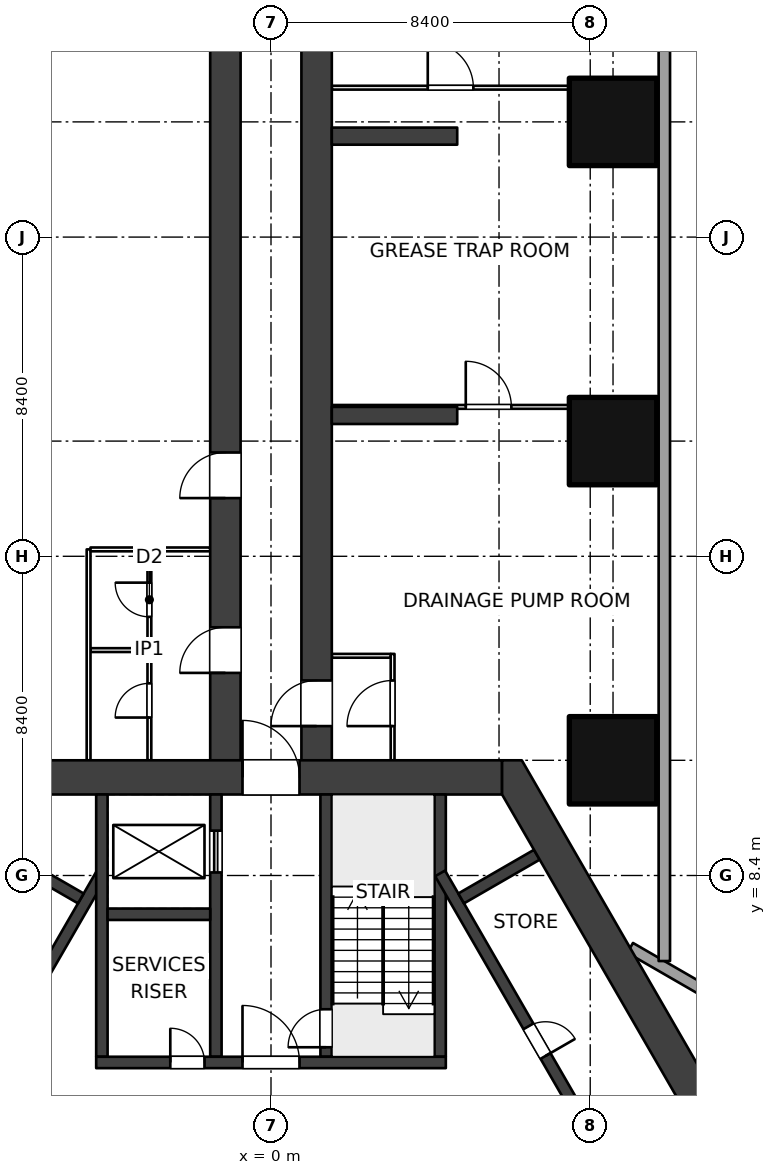
"""IFC4 building model, lengths in metres.
Left out: names, types, materials, properties, quantities, classifications, styles, units other than length and angle.
Written with IfcOpenShell. Run it as: python <this file> out.ifc"""

import sys

from ifc_helpers import new_model, si_unit, direction, frame, frame_2d, origin, origin_2d, place, context, subcontext, project, spatial, polyline, rectangle, outline, extrude, element, fill, save


model = new_model("IFC4")
c1 = context("Model", 3, precision=1e-05, world=origin(), true_north=direction((0.0, 1.0)))
c2 = subcontext(c1, "Body", "Model", "MODEL_VIEW")
j1 = project(units=[si_unit("LENGTHUNIT", "METRE"), si_unit("PLANEANGLEUNIT", "RADIAN")], contexts=[c1])
p1 = place(None, origin())
s1 = spatial("IfcSite", under=j1, at=p1, CompositionType="ELEMENT")
p2 = place(p1, origin())
s2 = spatial("IfcBuilding", under=s1, at=p2, CompositionType="ELEMENT")
p3 = place(p2, frame((0.0, 0.0, -7.0)))
s3 = spatial("IfcBuildingStorey", under=s2, at=p3, CompositionType="ELEMENT", Elevation=-7.0)
for number, where, z_axis, x_axis in (
    (1, (9.0, 11.432, 0.0), (0.0, 0.0, 1.0), (1.0, 0.0, 0.0)),
    (2, (9.0, 19.832, 0.0), (0.0, 0.0, 1.0), (1.0, 0.0, 0.0)),
    (3, (9.0, 28.231, 0.0), (0.0, 0.0, 1.0), (1.0, 0.0, 0.0)),
):
    element("IfcColumn", number, at=place(p3, frame(where, z_axis=z_axis, x_axis=x_axis)), inside=s3, PredefinedType="COLUMN", context=c2, shape_type="SweptSolid", body=[
        extrude(rectangle(XDim=2.3, YDim=2.3, at=origin_2d()), origin(), (0.0, 0.0, 1.0), 3.5),
    ])
p4 = place(p3, frame((-6.08, 10.981, 0.0), z_axis=(0.0, 0.0, 1.0), x_axis=(1.0, 0.0, 0.0)))
e4 = element("IfcWall", 4, at=p4, inside=s3, PredefinedType="SHEAR", context=c2, shape_type="SweptSolid", body=[
    extrude(rectangle(XDim=12.161, YDim=0.9, at=frame_2d((6.08, 0.0))), origin(), (0.0, 0.0, 1.0), 3.5),
])
p5 = place(p4, frame((5.33, 0.0, 0.0)))
e5 = element("IfcOpeningElement", 5, at=p5, cuts=e4, PredefinedType="OPENING", context=c2, shape_type="SweptSolid", body=[
    extrude(rectangle(XDim=1.5, YDim=2.1, at=frame_2d((0.75, 1.05))), frame((0.0, 0.46, 0.0), z_axis=(0.0, -1.0, 0.0), x_axis=(1.0, 0.0, 0.0)), (0.0, 0.0, 1.0), 0.92),
])
p6 = place(p3, origin())
e6 = element("IfcWall", 6, at=p6, inside=s3, PredefinedType="SHEAR", context=c2, shape_type="SweptSolid", body=[
    extrude(outline(polyline([(13.2, 0.0), (6.6, 11.432), (6.08, 11.432), (6.08, 10.531), (12.161, 0.0), (12.94, -0.45), (13.2, 0.0)])), origin(), (0.0, 0.0, 1.0), 3.5),
])
p7 = place(p3, frame((-4.6, 3.48, 0.0), z_axis=(0.0, 0.0, 1.0), x_axis=(1.0, 0.0, 0.0)))
e7 = element("IfcWall", 7, at=p7, inside=s3, PredefinedType="SHEAR", context=c2, shape_type="SweptSolid", body=[
    extrude(rectangle(XDim=9.2, YDim=0.3, at=frame_2d((4.6, 0.0))), origin(), (0.0, 0.0, 1.0), 3.5),
])
p8 = place(p7, frame((3.85, 0.0, 0.0)))
e8 = element("IfcOpeningElement", 8, at=p8, cuts=e7, PredefinedType="OPENING", context=c2, shape_type="SweptSolid", body=[
    extrude(rectangle(XDim=1.5, YDim=2.1, at=frame_2d((0.75, 1.05))), frame((0.0, 0.16, 0.0), z_axis=(0.0, -1.0, 0.0), x_axis=(1.0, 0.0, 0.0)), (0.0, 0.0, 1.0), 0.32),
])
p9 = place(p7, frame((1.95, 0.0, 0.0)))
e9 = element("IfcOpeningElement", 9, at=p9, cuts=e7, PredefinedType="OPENING", context=c2, shape_type="SweptSolid", body=[
    extrude(rectangle(XDim=0.9, YDim=2.1, at=frame_2d((0.45, 1.05))), frame((0.0, 0.16, 0.0), z_axis=(0.0, -1.0, 0.0), x_axis=(1.0, 0.0, 0.0)), (0.0, 0.0, 1.0), 0.32),
])
p10 = place(p3, frame((1.45, 3.63, 0.0), z_axis=(0.0, 0.0, 1.0), x_axis=(0.0, 1.0, 0.0)))
e10 = element("IfcWall", 10, at=p10, inside=s3, PredefinedType="SHEAR", context=c2, shape_type="SweptSolid", body=[
    extrude(rectangle(XDim=6.902, YDim=0.3, at=frame_2d((3.451, 0.0))), origin(), (0.0, 0.0, 1.0), 3.5),
])
p11 = place(p10, frame((0.25, 0.0, 0.0)))
e11 = element("IfcOpeningElement", 11, at=p11, cuts=e10, PredefinedType="OPENING", context=c2, shape_type="SweptSolid", body=[
    extrude(rectangle(XDim=1.0, YDim=2.1, at=frame_2d((0.5, 1.05))), frame((0.0, 0.16, 0.0), z_axis=(0.0, -1.0, 0.0), x_axis=(1.0, 0.0, 0.0)), (0.0, 0.0, 1.0), 0.32),
])
p12 = place(p3, frame((4.45, 3.63, 0.0), z_axis=(0.0, 0.0, 1.0), x_axis=(0.0, 1.0, 0.0)))
e12 = element("IfcWall", 12, at=p12, inside=s3, PredefinedType="SHEAR", context=c2, shape_type="SweptSolid", body=[
    extrude(rectangle(XDim=6.902, YDim=0.3, at=frame_2d((3.451, 0.0))), origin(), (0.0, 0.0, 1.0), 3.5),
])
p13 = place(p3, frame((-1.45, 3.63, 0.0), z_axis=(0.0, 0.0, 1.0), x_axis=(0.0, 1.0, 0.0)))
e13 = element("IfcWall", 13, at=p13, inside=s3, PredefinedType="SHEAR", context=c2, shape_type="SweptSolid", body=[
    extrude(rectangle(XDim=6.902, YDim=0.3, at=frame_2d((3.451, 0.0))), origin(), (0.0, 0.0, 1.0), 3.5),
])
p14 = place(p13, frame((4.85, 0.0, 0.0)))
e14 = element("IfcOpeningElement", 14, at=p14, cuts=e13, PredefinedType="OPENING", context=c2, shape_type="SweptSolid", body=[
    extrude(rectangle(XDim=1.1, YDim=2.1, at=frame_2d((0.55, 1.05))), frame((0.0, 0.16, 0.0), z_axis=(0.0, -1.0, 0.0), x_axis=(1.0, 0.0, 0.0)), (0.0, 0.0, 1.0), 0.32),
])
p15 = place(p3, frame((-4.45, 3.63, 0.0), z_axis=(0.0, 0.0, 1.0), x_axis=(0.0, 1.0, 0.0)))
e15 = element("IfcWall", 15, at=p15, inside=s3, PredefinedType="SHEAR", context=c2, shape_type="SweptSolid", body=[
    extrude(rectangle(XDim=6.902, YDim=0.3, at=frame_2d((3.451, 0.0))), origin(), (0.0, 0.0, 1.0), 3.5),
])
p16 = place(p3, frame((-4.3, 7.38, 0.0), z_axis=(0.0, 0.0, 1.0), x_axis=(1.0, 0.0, 0.0)))
e16 = element("IfcWall", 16, at=p16, inside=s3, PredefinedType="SHEAR", context=c2, shape_type="SweptSolid", body=[
    extrude(rectangle(XDim=2.7, YDim=0.3, at=frame_2d((1.35, 0.0))), origin(), (0.0, 0.0, 1.0), 3.5),
])
p17 = place(p3, frame((4.45, 8.455, 0.0), z_axis=(0.0, 0.0, 1.0), x_axis=(0.500002290144, -0.866024081565, 0.0)))
e17 = element("IfcWall", 17, at=p17, inside=s3, PredefinedType="SHEAR", context=c2, shape_type="SweptSolid", body=[
    extrude(rectangle(XDim=10.195, YDim=0.3, at=frame_2d((5.098, 0.0))), origin(), (0.0, 0.0, 1.0), 3.5),
])
p18 = place(p17, frame((4.648, 0.0, 0.0)))
e18 = element("IfcOpeningElement", 18, at=p18, cuts=e17, PredefinedType="OPENING", context=c2, shape_type="SweptSolid", body=[
    extrude(rectangle(XDim=0.9, YDim=2.1, at=frame_2d((0.45, 1.05))), frame((0.0, 0.16, 0.0), z_axis=(0.0, -1.0, 0.0), x_axis=(1.0, 0.0, 0.0)), (0.0, 0.0, 1.0), 0.32),
])
p19 = place(p3, frame((5.004, 7.796, 0.0), z_axis=(0.0, 0.0, 1.0), x_axis=(0.866053019151, 0.499952165731, 0.0)))
e19 = element("IfcWall", 19, at=p19, inside=s3, PredefinedType="SHEAR", context=c2, shape_type="SweptSolid", body=[
    extrude(rectangle(XDim=2.3, YDim=0.3, at=frame_2d((1.15, 0.0))), origin(), (0.0, 0.0, 1.0), 3.5),
])
p20 = place(p3, frame((-9.548, -0.374, 0.0), z_axis=(0.0, 0.0, 1.0), x_axis=(0.500002290144, 0.866024081565, 0.0)))
e20 = element("IfcWall", 20, at=p20, inside=s3, PredefinedType="SHEAR", context=c2, shape_type="SweptSolid", body=[
    extrude(rectangle(XDim=10.195, YDim=0.3, at=frame_2d((5.098, 0.0))), origin(), (0.0, 0.0, 1.0), 3.5),
])
p21 = place(p20, frame((4.648, 0.0, 0.0)))
e21 = element("IfcOpeningElement", 21, at=p21, cuts=e20, PredefinedType="OPENING", context=c2, shape_type="SweptSolid", body=[
    extrude(rectangle(XDim=0.9, YDim=2.1, at=frame_2d((0.45, 1.05))), frame((0.0, 0.16, 0.0), z_axis=(0.0, -1.0, 0.0), x_axis=(1.0, 0.0, 0.0)), (0.0, 0.0, 1.0), 0.32),
])
p22 = place(p3, frame((-5.004, 7.796, 0.0), z_axis=(0.0, 0.0, 1.0), x_axis=(-0.866053019151, 0.499952165731, 0.0)))
e22 = element("IfcWall", 22, at=p22, inside=s3, PredefinedType="SHEAR", context=c2, shape_type="SweptSolid", body=[
    extrude(rectangle(XDim=2.3, YDim=0.3, at=frame_2d((1.15, 0.0))), origin(), (0.0, 0.0, 1.0), 3.5),
])
p23 = place(p3, frame((-1.2, 10.981, 0.0), z_axis=(0.0, 0.0, 1.0), x_axis=(0.0, 1.0, 0.0)))
e23 = element("IfcWall", 23, at=p23, inside=s3, PredefinedType="SHEAR", context=c2, shape_type="SweptSolid", body=[
    extrude(rectangle(XDim=36.75, YDim=0.8, at=frame_2d((18.375, 0.0))), origin(), (0.0, 0.0, 1.0), 3.5),
])
p24 = place(p23, frame((2.75, 0.0, 0.0)))
e24 = element("IfcOpeningElement", 24, at=p24, cuts=e23, PredefinedType="OPENING", context=c2, shape_type="SweptSolid", body=[
    extrude(rectangle(XDim=1.2, YDim=2.1, at=frame_2d((0.6, 1.05))), frame((0.0, 0.41, 0.0), z_axis=(0.0, -1.0, 0.0), x_axis=(1.0, 0.0, 0.0)), (0.0, 0.0, 1.0), 0.82),
])
p25 = place(p23, frame((7.35, 0.0, 0.0)))
e25 = element("IfcOpeningElement", 25, at=p25, cuts=e23, PredefinedType="OPENING", context=c2, shape_type="SweptSolid", body=[
    extrude(rectangle(XDim=1.2, YDim=2.1, at=frame_2d((0.6, 1.05))), frame((0.0, 0.41, 0.0), z_axis=(0.0, -1.0, 0.0), x_axis=(1.0, 0.0, 0.0)), (0.0, 0.0, 1.0), 0.82),
])
p26 = place(p3, frame((1.2, 10.981, 0.0), z_axis=(0.0, 0.0, 1.0), x_axis=(0.0, 1.0, 0.0)))
e26 = element("IfcWall", 26, at=p26, inside=s3, PredefinedType="SHEAR", context=c2, shape_type="SweptSolid", body=[
    extrude(rectangle(XDim=36.75, YDim=0.8, at=frame_2d((18.375, 0.0))), origin(), (0.0, 0.0, 1.0), 3.5),
])
p27 = place(p26, frame((1.35, 0.0, 0.0)))
e27 = element("IfcOpeningElement", 27, at=p27, cuts=e26, PredefinedType="OPENING", context=c2, shape_type="SweptSolid", body=[
    extrude(rectangle(XDim=1.2, YDim=2.1, at=frame_2d((0.6, 1.05))), frame((0.0, 0.41, 0.0), z_axis=(0.0, -1.0, 0.0), x_axis=(1.0, 0.0, 0.0)), (0.0, 0.0, 1.0), 0.82),
])
p28 = place(p3, frame((-3.2, 11.432, 0.0), z_axis=(0.0, 0.0, 1.0), x_axis=(0.0, 1.0, 0.0)))
e28 = element("IfcWall", 28, at=p28, inside=s3, PredefinedType="PARTITIONING", context=c2, shape_type="SweptSolid", body=[
    extrude(rectangle(XDim=5.6, YDim=0.1, at=frame_2d((2.8, 0.0))), origin(), (0.0, 0.0, 1.0), 3.2),
])
p29 = place(p28, frame((1.125, 0.0, 0.0)))
e29 = element("IfcOpeningElement", 29, at=p29, cuts=e28, PredefinedType="OPENING", context=c2, shape_type="SweptSolid", body=[
    extrude(rectangle(XDim=0.9, YDim=2.1, at=frame_2d((0.45, 1.05))), frame((0.0, 0.06, 0.0), z_axis=(0.0, -1.0, 0.0), x_axis=(1.0, 0.0, 0.0)), (0.0, 0.0, 1.0), 0.12),
])
p30 = place(p28, frame((3.775, 0.0, 0.0)))
e30 = element("IfcOpeningElement", 30, at=p30, cuts=e28, PredefinedType="OPENING", context=c2, shape_type="SweptSolid", body=[
    extrude(rectangle(XDim=0.9, YDim=2.1, at=frame_2d((0.45, 1.05))), frame((0.0, 0.06, 0.0), z_axis=(0.0, -1.0, 0.0), x_axis=(1.0, 0.0, 0.0)), (0.0, 0.0, 1.0), 0.12),
])
p31 = place(p3, frame((-3.25, 14.332, 0.0), z_axis=(0.0, 0.0, 1.0), x_axis=(-1.0, 0.0, 0.0)))
e31 = element("IfcWall", 31, at=p31, inside=s3, PredefinedType="PARTITIONING", context=c2, shape_type="SweptSolid", body=[
    extrude(rectangle(XDim=1.5, YDim=0.1, at=frame_2d((0.75, 0.0))), origin(), (0.0, 0.0, 1.0), 3.2),
])
p32 = place(p3, frame((-4.8, 11.432, 0.0), z_axis=(0.0, 0.0, 1.0), x_axis=(0.0, 1.0, 0.0)))
e32 = element("IfcWall", 32, at=p32, inside=s3, PredefinedType="PARTITIONING", context=c2, shape_type="SweptSolid", body=[
    extrude(rectangle(XDim=5.55, YDim=0.1, at=frame_2d((2.775, 0.0))), origin(), (0.0, 0.0, 1.0), 3.2),
])
p33 = place(p3, frame((-1.6, 16.981, 0.0), z_axis=(0.0, 0.0, 1.0), x_axis=(-1.0, 0.0, 0.0)))
e33 = element("IfcWall", 33, at=p33, inside=s3, PredefinedType="PARTITIONING", context=c2, shape_type="SweptSolid", body=[
    extrude(rectangle(XDim=3.15, YDim=0.1, at=frame_2d((1.575, 0.0))), origin(), (0.0, 0.0, 1.0), 3.2),
])
p34 = place(p3, frame((3.2, 11.432, 0.0), z_axis=(0.0, 0.0, 1.0), x_axis=(0.0, 1.0, 0.0)))
e34 = element("IfcWall", 34, at=p34, inside=s3, PredefinedType="PARTITIONING", context=c2, shape_type="SweptSolid", body=[
    extrude(rectangle(XDim=2.8, YDim=0.1, at=frame_2d((1.4, 0.0))), origin(), (0.0, 0.0, 1.0), 3.2),
])
p35 = place(p34, frame((0.9, 0.0, 0.0)))
e35 = element("IfcOpeningElement", 35, at=p35, cuts=e34, PredefinedType="OPENING", context=c2, shape_type="SweptSolid", body=[
    extrude(rectangle(XDim=1.2, YDim=2.1, at=frame_2d((0.6, 1.05))), frame((0.0, 0.06, 0.0), z_axis=(0.0, -1.0, 0.0), x_axis=(1.0, 0.0, 0.0)), (0.0, 0.0, 1.0), 0.12),
])
p36 = place(p3, frame((1.6, 14.182, 0.0), z_axis=(0.0, 0.0, 1.0), x_axis=(1.0, 0.0, 0.0)))
e36 = element("IfcWall", 36, at=p36, inside=s3, PredefinedType="PARTITIONING", context=c2, shape_type="SweptSolid", body=[
    extrude(rectangle(XDim=1.55, YDim=0.1, at=frame_2d((0.775, 0.0))), origin(), (0.0, 0.0, 1.0), 3.2),
])
p37 = place(p3, frame((1.6, 20.731, 0.0), z_axis=(0.0, 0.0, 1.0), x_axis=(1.0, 0.0, 0.0)))
e37 = element("IfcWall", 37, at=p37, inside=s3, PredefinedType="PARTITIONING", context=c2, shape_type="SweptSolid", body=[
    extrude(rectangle(XDim=8.6, YDim=0.1, at=frame_2d((4.3, 0.0))), origin(), (0.0, 0.0, 1.0), 3.2),
])
p38 = place(p37, frame((3.525, 0.0, 0.0)))
e38 = element("IfcOpeningElement", 38, at=p38, cuts=e37, PredefinedType="OPENING", context=c2, shape_type="SweptSolid", body=[
    extrude(rectangle(XDim=1.2, YDim=2.1, at=frame_2d((0.6, 1.05))), frame((0.0, 0.06, 0.0), z_axis=(0.0, -1.0, 0.0), x_axis=(1.0, 0.0, 0.0)), (0.0, 0.0, 1.0), 0.12),
])
p39 = place(p3, frame((1.6, 29.132, 0.0), z_axis=(0.0, 0.0, 1.0), x_axis=(1.0, 0.0, 0.0)))
e39 = element("IfcWall", 39, at=p39, inside=s3, PredefinedType="PARTITIONING", context=c2, shape_type="SweptSolid", body=[
    extrude(rectangle(XDim=8.6, YDim=0.1, at=frame_2d((4.3, 0.0))), origin(), (0.0, 0.0, 1.0), 3.2),
])
p40 = place(p39, frame((2.525, 0.0, 0.0)))
e40 = element("IfcOpeningElement", 40, at=p40, cuts=e39, PredefinedType="OPENING", context=c2, shape_type="SweptSolid", body=[
    extrude(rectangle(XDim=1.2, YDim=2.1, at=frame_2d((0.6, 1.05))), frame((0.0, 0.06, 0.0), z_axis=(0.0, -1.0, 0.0), x_axis=(1.0, 0.0, 0.0)), (0.0, 0.0, 1.0), 0.12),
])
p41 = place(p3, frame((10.35, 6.149, 0.0), z_axis=(0.0, 0.0, 1.0), x_axis=(0.0, 1.0, 0.0)))
e41 = element("IfcWall", 41, at=p41, inside=s3, PredefinedType="SOLIDWALL", context=c2, shape_type="SweptSolid", body=[
    extrude(rectangle(XDim=41.883, YDim=0.3, at=frame_2d((20.941, 0.0))), origin(), (0.0, 0.0, 1.0), 3.2),
])
p42 = place(p41, frame((25.383, 0.0, 0.0)))
e42 = element("IfcOpeningElement", 42, at=p42, cuts=e41, PredefinedType="OPENING", context=c2, shape_type="SweptSolid", body=[
    extrude(rectangle(XDim=1.8, YDim=2.4, at=frame_2d((0.9, 1.2))), frame((0.0, 0.16, 0.0), z_axis=(0.0, -1.0, 0.0), x_axis=(1.0, 0.0, 0.0)), (0.0, 0.0, 1.0), 0.32),
])
p43 = place(p3, frame((9.45, 6.495, 0.0), z_axis=(0.0, 0.0, 1.0), x_axis=(0.866025301493, -0.500000177174, 0.0)))
e43 = element("IfcWall", 43, at=p43, inside=s3, PredefinedType="SOLIDWALL", context=c2, shape_type="SweptSolid", body=[
    extrude(rectangle(XDim=43.095, YDim=0.3, at=frame_2d((21.548, 0.0))), origin(), (0.0, 0.0, 1.0), 3.2),
])
p44 = place(p43, frame((26.595, 0.0, 0.0)))
e44 = element("IfcOpeningElement", 44, at=p44, cuts=e43, PredefinedType="OPENING", context=c2, shape_type="SweptSolid", body=[
    extrude(rectangle(XDim=1.8, YDim=2.4, at=frame_2d((0.9, 1.2))), frame((0.0, 0.16, 0.0), z_axis=(0.0, -1.0, 0.0), x_axis=(1.0, 0.0, 0.0)), (0.0, 0.0, 1.0), 0.32),
])
for number, where, z_axis, x_axis in (
    (45, (1.6, 20.507, 0.0), (0.0, 0.0, 1.0), (1.0, 0.0, 0.0)),
    (46, (1.6, 27.856, 0.0), (0.0, 0.0, 1.0), (1.0, 0.0, 0.0)),
):
    element("IfcWall", number, at=place(p3, frame(where, z_axis=z_axis, x_axis=x_axis)), inside=s3, PredefinedType="SOLIDWALL", context=c2, shape_type="SweptSolid", body=[
        extrude(rectangle(XDim=3.3, YDim=0.45, at=frame_2d((1.65, 0.0))), origin(), (0.0, 0.0, 1.0), 3.5),
    ])
p45 = place(p14, origin())
e47 = element("IfcDoor", 47, at=p45, inside=s3, OperationType="DOUBLE_DOOR_SLIDING", PredefinedType="DOOR", context=c2, shape_type="SweptSolid", body=[
    extrude(rectangle(XDim=1.1, YDim=2.1, at=frame_2d((0.55, 1.05))), frame((0.0, 0.025, 0.0), z_axis=(0.0, -1.0, 0.0), x_axis=(1.0, 0.0, 0.0)), (0.0, 0.0, 1.0), 0.05),
])
fill(e14, e47)
p46 = place(p8, origin())
e48 = element("IfcDoor", 48, at=p46, inside=s3, OperationType="DOUBLE_DOOR_DOUBLE_SWING", PredefinedType="DOOR", context=c2, shape_type="SweptSolid", body=[
    extrude(rectangle(XDim=1.5, YDim=2.1, at=frame_2d((0.75, 1.05))), frame((0.0, 0.025, 0.0), z_axis=(0.0, -1.0, 0.0), x_axis=(1.0, 0.0, 0.0)), (0.0, 0.0, 1.0), 0.05),
])
fill(e8, e48)
p47 = place(p9, origin())
e49 = element("IfcDoor", 49, at=p47, inside=s3, OperationType="SINGLE_SWING_LEFT", PredefinedType="DOOR", context=c2, shape_type="SweptSolid", body=[
    extrude(rectangle(XDim=0.9, YDim=2.1, at=frame_2d((0.45, 1.05))), frame((0.0, 0.025, 0.0), z_axis=(0.0, -1.0, 0.0), x_axis=(1.0, 0.0, 0.0)), (0.0, 0.0, 1.0), 0.05),
])
fill(e9, e49)
p48 = place(p11, origin())
e50 = element("IfcDoor", 50, at=p48, inside=s3, OperationType="SINGLE_SWING_LEFT", PredefinedType="DOOR", context=c2, shape_type="SweptSolid", body=[
    extrude(rectangle(XDim=1.0, YDim=2.1, at=frame_2d((0.5, 1.05))), frame((0.0, 0.025, 0.0), z_axis=(0.0, -1.0, 0.0), x_axis=(1.0, 0.0, 0.0)), (0.0, 0.0, 1.0), 0.05),
])
fill(e11, e50)
p49 = place(p5, origin())
e51 = element("IfcDoor", 51, at=p49, inside=s3, OperationType="DOUBLE_DOOR_DOUBLE_SWING", PredefinedType="DOOR", context=c2, shape_type="SweptSolid", body=[
    extrude(rectangle(XDim=1.5, YDim=2.1, at=frame_2d((0.75, 1.05))), frame((0.0, 0.025, 0.0), z_axis=(0.0, -1.0, 0.0), x_axis=(1.0, 0.0, 0.0)), (0.0, 0.0, 1.0), 0.05),
])
fill(e5, e51)
p50 = place(p18, origin())
e52 = element("IfcDoor", 52, at=p50, inside=s3, OperationType="SINGLE_SWING_RIGHT", PredefinedType="DOOR", context=c2, shape_type="SweptSolid", body=[
    extrude(rectangle(XDim=0.9, YDim=2.1, at=frame_2d((0.45, 1.05))), frame((0.0, 0.025, 0.0), z_axis=(0.0, -1.0, 0.0), x_axis=(1.0, 0.0, 0.0)), (0.0, 0.0, 1.0), 0.05),
])
fill(e18, e52)
p51 = place(p29, origin())
e53 = element("IfcDoor", 53, at=p51, inside=s3, OperationType="SINGLE_SWING_LEFT", PredefinedType="DOOR", context=c2, shape_type="SweptSolid", body=[
    extrude(rectangle(XDim=0.9, YDim=2.1, at=frame_2d((0.45, 1.05))), frame((0.0, 0.025, 0.0), z_axis=(0.0, -1.0, 0.0), x_axis=(1.0, 0.0, 0.0)), (0.0, 0.0, 1.0), 0.05),
])
fill(e29, e53)
p52 = place(p30, origin())
e54 = element("IfcDoor", 54, at=p52, inside=s3, OperationType="SINGLE_SWING_RIGHT", PredefinedType="DOOR", context=c2, shape_type="SweptSolid", body=[
    extrude(rectangle(XDim=0.9, YDim=2.1, at=frame_2d((0.45, 1.05))), frame((0.0, 0.025, 0.0), z_axis=(0.0, -1.0, 0.0), x_axis=(1.0, 0.0, 0.0)), (0.0, 0.0, 1.0), 0.05),
])
fill(e30, e54)
p53 = place(p24, origin())
e55 = element("IfcDoor", 55, at=p53, inside=s3, OperationType="DOUBLE_SWING_LEFT", PredefinedType="DOOR", context=c2, shape_type="SweptSolid", body=[
    extrude(rectangle(XDim=1.2, YDim=2.1, at=frame_2d((0.6, 1.05))), frame((0.0, 0.025, 0.0), z_axis=(0.0, -1.0, 0.0), x_axis=(1.0, 0.0, 0.0)), (0.0, 0.0, 1.0), 0.05),
])
fill(e24, e55)
p54 = place(p25, origin())
e56 = element("IfcDoor", 56, at=p54, inside=s3, OperationType="DOUBLE_SWING_LEFT", PredefinedType="DOOR", context=c2, shape_type="SweptSolid", body=[
    extrude(rectangle(XDim=1.2, YDim=2.1, at=frame_2d((0.6, 1.05))), frame((0.0, 0.025, 0.0), z_axis=(0.0, -1.0, 0.0), x_axis=(1.0, 0.0, 0.0)), (0.0, 0.0, 1.0), 0.05),
])
fill(e25, e56)
p55 = place(p27, origin())
e57 = element("IfcDoor", 57, at=p55, inside=s3, OperationType="DOUBLE_SWING_LEFT", PredefinedType="DOOR", context=c2, shape_type="SweptSolid", body=[
    extrude(rectangle(XDim=1.2, YDim=2.1, at=frame_2d((0.6, 1.05))), frame((0.0, 0.025, 0.0), z_axis=(0.0, -1.0, 0.0), x_axis=(1.0, 0.0, 0.0)), (0.0, 0.0, 1.0), 0.05),
])
fill(e27, e57)
p56 = place(p38, origin())
e58 = element("IfcDoor", 58, at=p56, inside=s3, OperationType="DOUBLE_SWING_LEFT", PredefinedType="DOOR", context=c2, shape_type="SweptSolid", body=[
    extrude(rectangle(XDim=1.2, YDim=2.1, at=frame_2d((0.6, 1.05))), frame((0.0, 0.025, 0.0), z_axis=(0.0, -1.0, 0.0), x_axis=(1.0, 0.0, 0.0)), (0.0, 0.0, 1.0), 0.05),
])
fill(e38, e58)
p57 = place(p40, origin())
e59 = element("IfcDoor", 59, at=p57, inside=s3, OperationType="DOUBLE_SWING_LEFT", PredefinedType="DOOR", context=c2, shape_type="SweptSolid", body=[
    extrude(rectangle(XDim=1.2, YDim=2.1, at=frame_2d((0.6, 1.05))), frame((0.0, 0.025, 0.0), z_axis=(0.0, -1.0, 0.0), x_axis=(1.0, 0.0, 0.0)), (0.0, 0.0, 1.0), 0.05),
])
fill(e40, e59)
p58 = place(p35, origin())
e60 = element("IfcDoor", 60, at=p58, inside=s3, OperationType="DOUBLE_SWING_LEFT", PredefinedType="DOOR", context=c2, shape_type="SweptSolid", body=[
    extrude(rectangle(XDim=1.2, YDim=2.1, at=frame_2d((0.6, 1.05))), frame((0.0, 0.025, 0.0), z_axis=(0.0, -1.0, 0.0), x_axis=(1.0, 0.0, 0.0)), (0.0, 0.0, 1.0), 0.05),
])
fill(e35, e60)
save(model, sys.argv[1])
